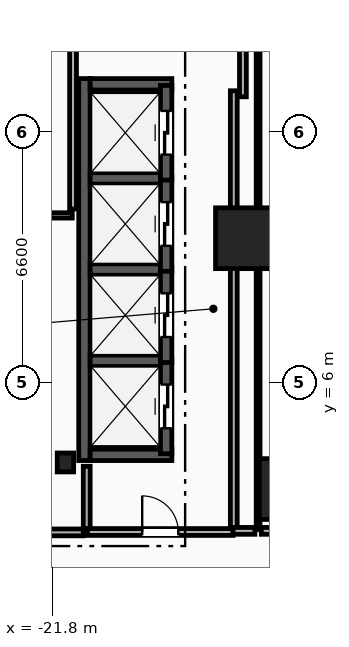
"""IFC4 building model, lengths in metres.
Left out: names, types, materials, properties, quantities, classifications, styles, units other than length and angle.
Written with IfcOpenShell. Run it as: python <this file> out.ifc"""

import sys

from ifc_helpers import new_model, si_unit, direction, frame, frame_2d, origin, origin_2d, place, context, subcontext, project, spatial, rectangle, i_section, extrude, element, fill, save


model = new_model("IFC4")
c1 = context("Model", 3, precision=1e-05, world=origin(), true_north=direction((0.0, 1.0)))
c2 = subcontext(c1, "Body", "Model", "MODEL_VIEW")
j1 = project(units=[si_unit("LENGTHUNIT", "METRE"), si_unit("PLANEANGLEUNIT", "RADIAN")], contexts=[c1])
p1 = place(None, origin())
s1 = spatial("IfcSite", under=j1, at=p1, CompositionType="ELEMENT")
p2 = place(p1, origin())
s2 = spatial("IfcBuilding", under=s1, at=p2, CompositionType="ELEMENT")
p3 = place(p2, origin())
s3 = spatial("IfcBuildingStorey", under=s2, at=p3, CompositionType="ELEMENT", Elevation=0.0)
p4 = place(p3, frame((-21.45, 3.9, 0.0), z_axis=(0.0, 0.0, 1.0), x_axis=(1.0, 0.0, 0.0)))
e1 = element("IfcColumn", 1, at=p4, inside=s3, PredefinedType="COLUMN", context=c2, shape_type="SweptSolid", body=[
    extrude(i_section(OverallWidth=0.432, OverallDepth=0.498, WebThickness=0.056, FlangeThickness=0.089, FilletRadius=0.018, at=origin_2d()), origin(), (0.0, 0.0, 1.0), 6.0),
])
for number, where, z_axis, x_axis in (
    (2, (-15.55, 3.2, 0.0), (0.0, 0.0, 1.0), (1.0, 0.0, 0.0)),
    (3, (-16.7, 9.8, 0.0), (0.0, 0.0, 1.0), (1.0, 0.0, 0.0)),
):
    element("IfcColumn", number, at=place(p3, frame(where, z_axis=z_axis, x_axis=x_axis)), inside=s3, PredefinedType="COLUMN", context=c2, shape_type="SweptSolid", body=[
        extrude(rectangle(XDim=1.6, YDim=1.6, at=origin_2d()), origin(), (0.0, 0.0, 1.0), 6.0),
    ])
p5 = place(p3, frame((-20.89, 2.15, 0.0), z_axis=(0.0, 0.0, 1.0), x_axis=(0.0, 1.0, 0.0)))
e4 = element("IfcWall", 4, at=p5, inside=s3, PredefinedType="PARTITIONING", context=c2, shape_type="SweptSolid", body=[
    extrude(rectangle(XDim=1.65, YDim=0.18, at=frame_2d((0.825, 0.0))), origin(), (0.0, 0.0, 1.0), 5.65),
])
p6 = place(p3, frame((-23.98, 2.06, 0.0), z_axis=(0.0, 0.0, 1.0), x_axis=(1.0, 0.0, 0.0)))
e5 = element("IfcWall", 5, at=p6, inside=s3, PredefinedType="PARTITIONING", context=c2, shape_type="SweptSolid", body=[
    extrude(rectangle(XDim=3.0, YDim=0.18, at=frame_2d((1.5, 0.0))), origin(), (0.0, 0.0, 1.0), 5.65),
])
p7 = place(p6, frame((0.9, 0.0, 0.0)))
e6 = element("IfcOpeningElement", 6, at=p7, cuts=e5, PredefinedType="OPENING", context=c2, shape_type="SweptSolid", body=[
    extrude(rectangle(XDim=1.2, YDim=2.15, at=frame_2d((0.6, 1.075))), frame((0.0, 0.1, 0.0), z_axis=(0.0, -1.0, 0.0), x_axis=(1.0, 0.0, 0.0)), (0.0, 0.0, 1.0), 0.2),
])
p8 = place(p3, frame((-20.95, 3.95, 0.0), z_axis=(0.0, 0.0, 1.0), x_axis=(0.0, 1.0, 0.0)))
e7 = element("IfcWall", 7, at=p8, inside=s3, PredefinedType="SHEAR", context=c2, shape_type="SweptSolid", body=[
    extrude(rectangle(XDim=10.05, YDim=0.3, at=frame_2d((5.025, 0.0))), origin(), (0.0, 0.0, 1.0), 5.65),
])
for number, where, z_axis, x_axis in (
    (8, (-20.8, 4.1, 0.0), (0.0, 0.0, 1.0), (1.0, 0.0, 0.0)),
    (9, (-20.8, 13.85, 0.0), (0.0, 0.0, 1.0), (1.0, 0.0, 0.0)),
):
    element("IfcWall", number, at=place(p3, frame(where, z_axis=z_axis, x_axis=x_axis)), inside=s3, PredefinedType="SHEAR", context=c2, shape_type="SweptSolid", body=[
        extrude(rectangle(XDim=2.15, YDim=0.3, at=frame_2d((1.075, 0.0))), origin(), (0.0, 0.0, 1.0), 5.65),
    ])
for number, where, z_axis, x_axis in (
    (10, (-20.8, 6.575, 0.0), (0.0, 0.0, 1.0), (1.0, 0.0, 0.0)),
    (11, (-20.8, 8.975, 0.0), (0.0, 0.0, 1.0), (1.0, 0.0, 0.0)),
    (12, (-20.8, 11.375, 0.0), (0.0, 0.0, 1.0), (1.0, 0.0, 0.0)),
):
    element("IfcWall", number, at=place(p3, frame(where, z_axis=z_axis, x_axis=x_axis)), inside=s3, PredefinedType="SHEAR", context=c2, shape_type="SweptSolid", body=[
        extrude(rectangle(XDim=1.85, YDim=0.3, at=frame_2d((0.925, 0.0))), origin(), (0.0, 0.0, 1.0), 5.65),
    ])
p9 = place(p3, frame((-18.8, 4.13, 0.0), z_axis=(0.0, 0.0, 1.0), x_axis=(0.0, 1.0, 0.0)))
e13 = element("IfcWall", 13, at=p9, inside=s3, PredefinedType="SHEAR", context=c2, shape_type="SweptSolid", body=[
    extrude(rectangle(XDim=2.49, YDim=0.3, at=frame_2d((1.245, 0.0))), origin(), (0.0, 0.0, 1.0), 5.65),
])
p10 = place(p9, frame((0.67, 0.0, 0.0)))
e14 = element("IfcOpeningElement", 14, at=p10, cuts=e13, PredefinedType="OPENING", context=c2, shape_type="SweptSolid", body=[
    extrude(rectangle(XDim=1.15, YDim=2.2, at=frame_2d((0.575, 1.1))), frame((0.0, 0.16, 0.0), z_axis=(0.0, -1.0, 0.0), x_axis=(1.0, 0.0, 0.0)), (0.0, 0.0, 1.0), 0.32),
])
p11 = place(p3, frame((-18.8, 6.53, 0.0), z_axis=(0.0, 0.0, 1.0), x_axis=(0.0, 1.0, 0.0)))
e15 = element("IfcWall", 15, at=p11, inside=s3, PredefinedType="SHEAR", context=c2, shape_type="SweptSolid", body=[
    extrude(rectangle(XDim=2.49, YDim=0.3, at=frame_2d((1.245, 0.0))), origin(), (0.0, 0.0, 1.0), 5.65),
])
p12 = place(p11, frame((0.67, 0.0, 0.0)))
e16 = element("IfcOpeningElement", 16, at=p12, cuts=e15, PredefinedType="OPENING", context=c2, shape_type="SweptSolid", body=[
    extrude(rectangle(XDim=1.15, YDim=2.2, at=frame_2d((0.575, 1.1))), frame((0.0, 0.16, 0.0), z_axis=(0.0, -1.0, 0.0), x_axis=(1.0, 0.0, 0.0)), (0.0, 0.0, 1.0), 0.32),
])
p13 = place(p3, frame((-18.8, 8.93, 0.0), z_axis=(0.0, 0.0, 1.0), x_axis=(0.0, 1.0, 0.0)))
e17 = element("IfcWall", 17, at=p13, inside=s3, PredefinedType="SHEAR", context=c2, shape_type="SweptSolid", body=[
    extrude(rectangle(XDim=2.49, YDim=0.3, at=frame_2d((1.245, 0.0))), origin(), (0.0, 0.0, 1.0), 5.65),
])
p14 = place(p13, frame((0.67, 0.0, 0.0)))
e18 = element("IfcOpeningElement", 18, at=p14, cuts=e17, PredefinedType="OPENING", context=c2, shape_type="SweptSolid", body=[
    extrude(rectangle(XDim=1.15, YDim=2.2, at=frame_2d((0.575, 1.1))), frame((0.0, 0.16, 0.0), z_axis=(0.0, -1.0, 0.0), x_axis=(1.0, 0.0, 0.0)), (0.0, 0.0, 1.0), 0.32),
])
p15 = place(p3, frame((-18.8, 11.33, 0.0), z_axis=(0.0, 0.0, 1.0), x_axis=(0.0, 1.0, 0.0)))
e19 = element("IfcWall", 19, at=p15, inside=s3, PredefinedType="SHEAR", context=c2, shape_type="SweptSolid", body=[
    extrude(rectangle(XDim=2.49, YDim=0.3, at=frame_2d((1.245, 0.0))), origin(), (0.0, 0.0, 1.0), 5.65),
])
p16 = place(p15, frame((0.67, 0.0, 0.0)))
e20 = element("IfcOpeningElement", 20, at=p16, cuts=e19, PredefinedType="OPENING", context=c2, shape_type="SweptSolid", body=[
    extrude(rectangle(XDim=1.15, YDim=2.2, at=frame_2d((0.575, 1.1))), frame((0.0, 0.16, 0.0), z_axis=(0.0, -1.0, 0.0), x_axis=(1.0, 0.0, 0.0)), (0.0, 0.0, 1.0), 0.32),
])
p17 = place(p3, frame((-17.02, 2.17, 0.0), z_axis=(0.0, 0.0, 1.0), x_axis=(0.0, 1.0, 0.0)))
e21 = element("IfcWall", 21, at=p17, inside=s3, PredefinedType="PARTITIONING", context=c2, shape_type="SweptSolid", body=[
    extrude(rectangle(XDim=11.51, YDim=0.18, at=frame_2d((5.755, 0.0))), origin(), (0.0, 0.0, 1.0), 5.65),
])
p18 = place(p3, frame((-20.87, 2.07, 0.0), z_axis=(0.0, 0.0, 1.0), x_axis=(1.0, 0.0, 0.0)))
e22 = element("IfcWall", 22, at=p18, inside=s3, PredefinedType="PARTITIONING", context=c2, shape_type="SweptSolid", body=[
    extrude(rectangle(XDim=3.83, YDim=0.18, at=frame_2d((1.915, 0.0))), origin(), (0.0, 0.0, 1.0), 5.65),
])
p19 = place(p18, frame((1.44, 0.0, 0.0)))
e23 = element("IfcOpeningElement", 23, at=p19, cuts=e22, PredefinedType="OPENING", context=c2, shape_type="SweptSolid", body=[
    extrude(rectangle(XDim=0.95, YDim=2.1, at=frame_2d((0.475, 1.05))), frame((0.0, 0.1, 0.0), z_axis=(0.0, -1.0, 0.0), x_axis=(1.0, 0.0, 0.0)), (0.0, 0.0, 1.0), 0.2),
])
p20 = place(p3, frame((-21.86, 10.4, 0.0), z_axis=(0.0, 0.0, 1.0), x_axis=(1.0, 0.0, 0.0)))
e24 = element("IfcWall", 24, at=p20, inside=s3, PredefinedType="PARTITIONING", context=c2, shape_type="SweptSolid", body=[
    extrude(rectangle(XDim=0.59, YDim=0.14, at=frame_2d((0.295, 0.0))), origin(), (0.0, 0.0, 1.0), 5.65),
])
p21 = place(p3, frame((-21.25, 10.57, 0.0), z_axis=(0.0, 0.0, 1.0), x_axis=(0.0, 1.0, 0.0)))
e25 = element("IfcWall", 25, at=p21, inside=s3, PredefinedType="PARTITIONING", context=c2, shape_type="SweptSolid", body=[
    extrude(rectangle(XDim=4.36, YDim=0.18, at=frame_2d((2.18, 0.0))), origin(), (0.0, 0.0, 1.0), 5.65),
])
p22 = place(p3, frame((-16.78, 13.521, 0.0), z_axis=(0.0, 0.0, 1.0), x_axis=(0.0, 1.0, 0.0)))
e26 = element("IfcWall", 26, at=p22, inside=s3, PredefinedType="PARTITIONING", context=c2, shape_type="SweptSolid", body=[
    extrude(rectangle(XDim=4.907, YDim=0.18, at=frame_2d((2.454, 0.0))), origin(), (0.0, 0.0, 1.0), 5.65),
])
p23 = place(p3, frame((-15.6, 2.1, 0.0), z_axis=(0.0, 0.0, 1.0), x_axis=(-1.0, 0.0, 0.0)))
e27 = element("IfcWall", 27, at=p23, inside=s3, PredefinedType="PARTITIONING", context=c2, shape_type="SweptSolid", body=[
    extrude(rectangle(XDim=0.695, YDim=0.18, at=frame_2d((0.347, 0.0))), origin(), (0.0, 0.0, 1.0), 5.65),
])
p24 = place(p3, frame((-16.465, 2.1, 0.0), z_axis=(0.0, 0.0, 1.0), x_axis=(-1.0, 0.0, 0.0)))
e28 = element("IfcWall", 28, at=p24, inside=s3, PredefinedType="PARTITIONING", context=c2, shape_type="SweptSolid", body=[
    extrude(rectangle(XDim=0.575, YDim=0.18, at=frame_2d((0.288, 0.0))), origin(), (0.0, 0.0, 1.0), 5.65),
])
p25 = place(p3, frame((-16.38, 2.13, 0.0), z_axis=(0.0, 0.0, 1.0), x_axis=(0.0, 1.0, 0.0)))
e29 = element("IfcWall", 29, at=p25, inside=s3, PredefinedType="PARTITIONING", context=c2, shape_type="SweptSolid", body=[
    extrude(rectangle(XDim=26.615, YDim=0.1, at=frame_2d((13.307, 0.0))), origin(), (0.0, 0.0, 1.0), 4.877),
])
p26 = place(p25, frame((19.94, 0.0, 0.0)))
e30 = element("IfcOpeningElement", 30, at=p26, cuts=e29, PredefinedType="OPENING", context=c2, shape_type="SweptSolid", body=[
    extrude(rectangle(XDim=1.6, YDim=2.2, at=frame_2d((0.8, 1.1))), frame((0.0, 0.06, 0.0), z_axis=(0.0, -1.0, 0.0), x_axis=(1.0, 0.0, 0.0)), (0.0, 0.0, 1.0), 0.12),
])
p27 = place(p10, origin())
e31 = element("IfcDoor", 31, at=p27, inside=s3, OperationType="SLIDING_TO_LEFT", PredefinedType="TRAPDOOR", context=c2, shape_type="SweptSolid", body=[
    extrude(rectangle(XDim=1.15, YDim=2.2, at=frame_2d((0.575, 1.1))), frame((0.0, 0.025, 0.0), z_axis=(0.0, -1.0, 0.0), x_axis=(1.0, 0.0, 0.0)), (0.0, 0.0, 1.0), 0.05),
])
fill(e14, e31)
p28 = place(p12, origin())
e32 = element("IfcDoor", 32, at=p28, inside=s3, OperationType="SLIDING_TO_LEFT", PredefinedType="TRAPDOOR", context=c2, shape_type="SweptSolid", body=[
    extrude(rectangle(XDim=1.15, YDim=2.2, at=frame_2d((0.575, 1.1))), frame((0.0, 0.025, 0.0), z_axis=(0.0, -1.0, 0.0), x_axis=(1.0, 0.0, 0.0)), (0.0, 0.0, 1.0), 0.05),
])
fill(e16, e32)
p29 = place(p14, origin())
e33 = element("IfcDoor", 33, at=p29, inside=s3, OperationType="SLIDING_TO_LEFT", PredefinedType="TRAPDOOR", context=c2, shape_type="SweptSolid", body=[
    extrude(rectangle(XDim=1.15, YDim=2.2, at=frame_2d((0.575, 1.1))), frame((0.0, 0.025, 0.0), z_axis=(0.0, -1.0, 0.0), x_axis=(1.0, 0.0, 0.0)), (0.0, 0.0, 1.0), 0.05),
])
fill(e18, e33)
p30 = place(p16, origin())
e34 = element("IfcDoor", 34, at=p30, inside=s3, OperationType="SLIDING_TO_LEFT", PredefinedType="TRAPDOOR", context=c2, shape_type="SweptSolid", body=[
    extrude(rectangle(XDim=1.15, YDim=2.2, at=frame_2d((0.575, 1.1))), frame((0.0, 0.025, 0.0), z_axis=(0.0, -1.0, 0.0), x_axis=(1.0, 0.0, 0.0)), (0.0, 0.0, 1.0), 0.05),
])
fill(e20, e34)
p31 = place(p19, origin())
e35 = element("IfcDoor", 35, at=p31, inside=s3, OperationType="SINGLE_SWING_LEFT", PredefinedType="DOOR", context=c2, shape_type="SweptSolid", body=[
    extrude(rectangle(XDim=0.95, YDim=2.1, at=frame_2d((0.475, 1.05))), frame((0.0, 0.025, 0.0), z_axis=(0.0, -1.0, 0.0), x_axis=(1.0, 0.0, 0.0)), (0.0, 0.0, 1.0), 0.05),
])
fill(e23, e35)
save(model, sys.argv[1])
